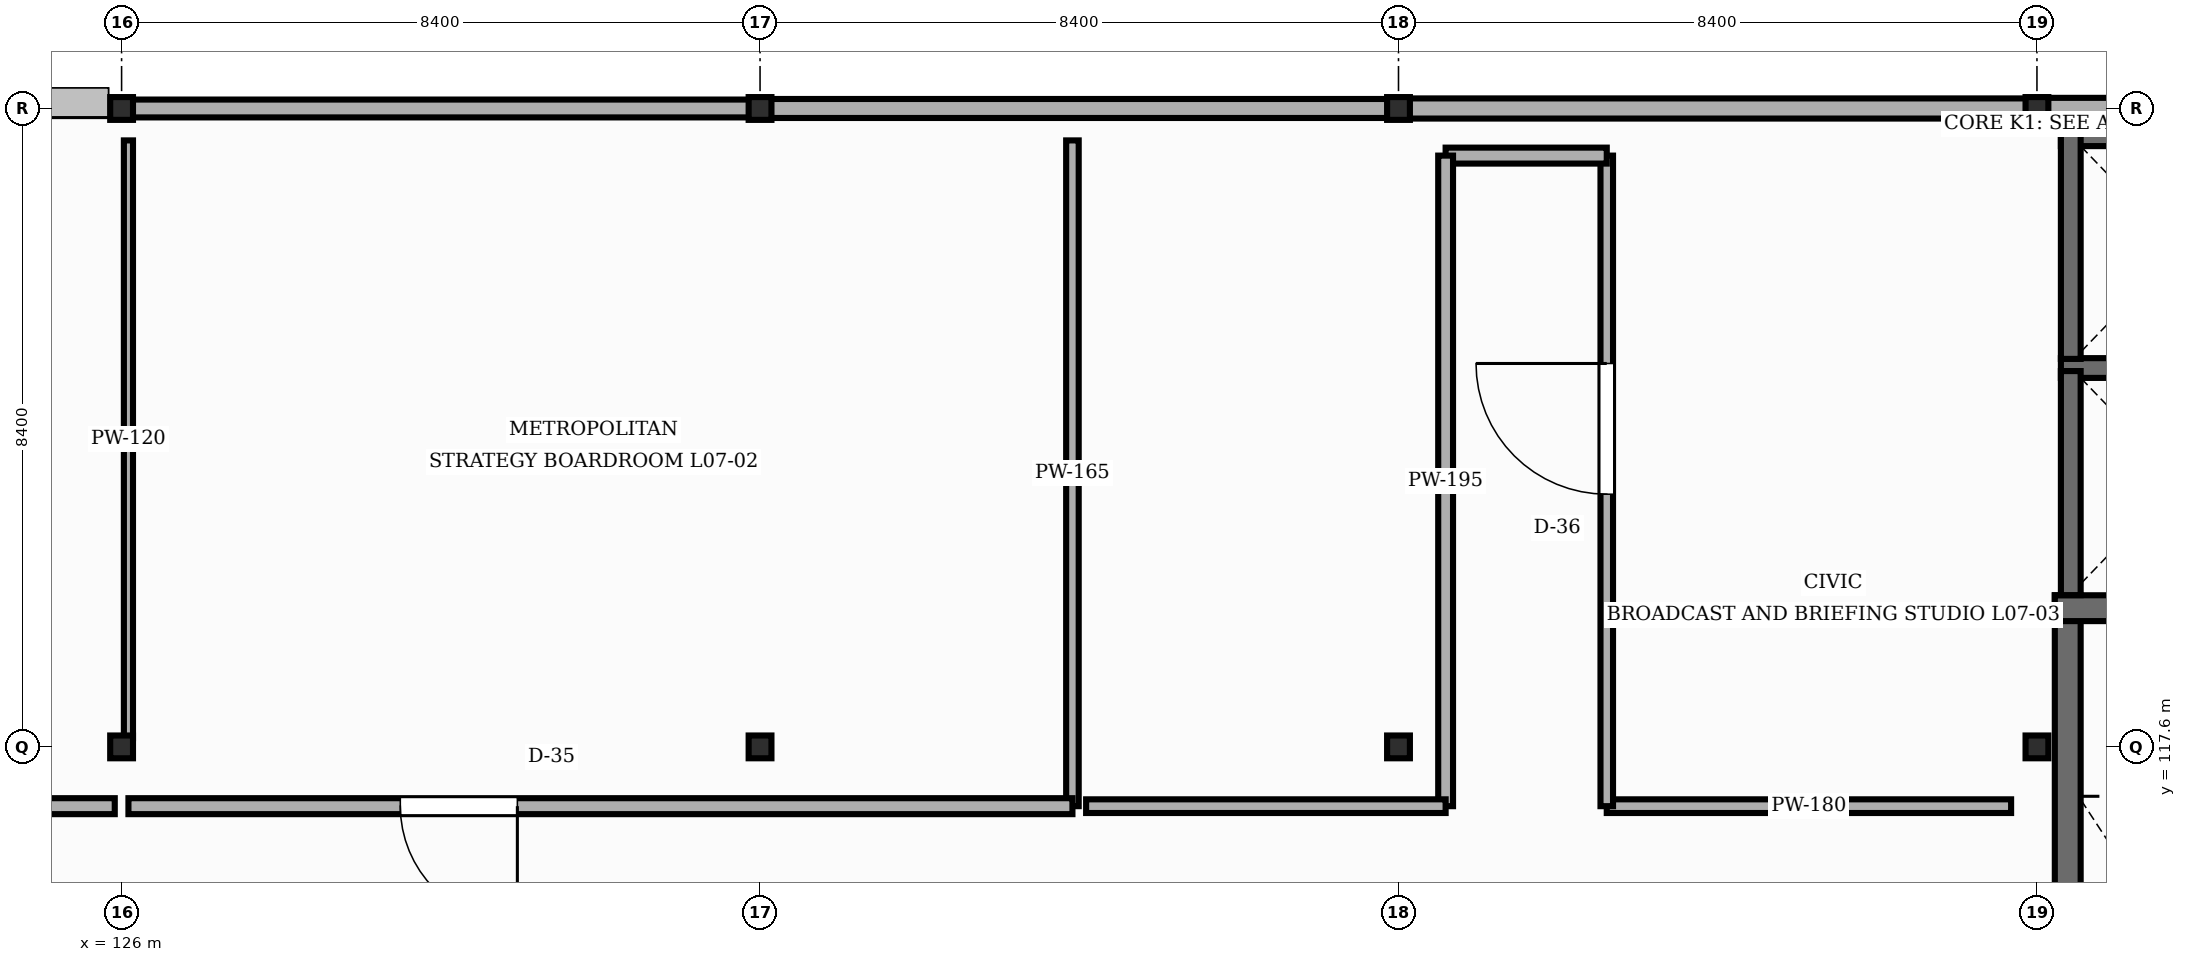
"""IFC4 building model, lengths in metres.
Left out: names, types, materials, properties, quantities, classifications, styles, units other than length and angle.
Written with IfcOpenShell. Run it as: python <this file> out.ifc"""

import sys

from ifc_helpers import new_model, si_unit, direction, frame, frame_2d, origin, origin_2d, place, context, subcontext, project, spatial, rectangle, i_section, extrude, element, fill, save


model = new_model("IFC4")
c1 = context("Model", 3, precision=1e-05, world=origin(), true_north=direction((0.0, 1.0)))
c2 = subcontext(c1, "Body", "Model", "MODEL_VIEW")
j1 = project(units=[si_unit("LENGTHUNIT", "METRE"), si_unit("PLANEANGLEUNIT", "RADIAN")], contexts=[c1])
p1 = place(None, origin())
s1 = spatial("IfcSite", under=j1, at=p1, CompositionType="ELEMENT")
p2 = place(p1, origin())
s2 = spatial("IfcBuilding", under=s1, at=p2, CompositionType="ELEMENT")
p3 = place(p2, frame((0.0, 0.0, 30.15)))
s3 = spatial("IfcBuildingStorey", under=s2, at=p3, CompositionType="ELEMENT", Elevation=30.15)
for number, where, z_axis, x_axis in (
    (1, (126.0, 117.6, 0.0), (0.0, 0.0, 1.0), (1.0, 0.0, 0.0)),
    (2, (126.0, 126.0, 0.0), (0.0, 0.0, 1.0), (1.0, 0.0, 0.0)),
    (3, (134.4, 117.6, 0.0), (0.0, 0.0, 1.0), (1.0, 0.0, 0.0)),
    (4, (134.4, 126.0, 0.0), (0.0, 0.0, 1.0), (1.0, 0.0, 0.0)),
    (5, (142.8, 117.6, 0.0), (0.0, 0.0, 1.0), (1.0, 0.0, 0.0)),
    (6, (142.8, 126.0, 0.0), (0.0, 0.0, 1.0), (1.0, 0.0, 0.0)),
    (7, (151.2, 117.6, 0.0), (0.0, 0.0, 1.0), (1.0, 0.0, 0.0)),
    (8, (151.2, 126.0, 0.0), (0.0, 0.0, 1.0), (1.0, 0.0, 0.0)),
):
    element("IfcColumn", number, at=place(p3, frame(where, z_axis=z_axis, x_axis=x_axis)), inside=s3, PredefinedType="COLUMN", context=c2, shape_type="SweptSolid", body=[
        extrude(i_section(OverallWidth=0.3, OverallDepth=0.3, WebThickness=0.011, FlangeThickness=0.019, FilletRadius=0.027, at=origin_2d()), origin(), (0.0, 0.0, 1.0), 4.2),
    ])
p4 = place(p3, frame((159.592, 126.0, 0.0), z_axis=(0.0, 0.0, 1.0), x_axis=(-1.0, 0.0, 0.0)))
e9 = element("IfcWall", 9, at=p4, inside=s3, PredefinedType="STANDARD", context=c2, shape_type="SweptSolid", body=[
    extrude(rectangle(XDim=8.384, YDim=0.28, at=frame_2d((4.192, 0.0))), origin(), (0.0, 0.0, 1.0), 3.692),
])
p5 = place(p3, frame((151.192, 126.0, 0.0), z_axis=(0.0, 0.0, 1.0), x_axis=(-1.0, 0.0, 0.0)))
e10 = element("IfcWall", 10, at=p5, inside=s3, PredefinedType="STANDARD", context=c2, shape_type="SweptSolid", body=[
    extrude(rectangle(XDim=8.384, YDim=0.265, at=frame_2d((4.192, 0.0))), origin(), (0.0, 0.0, 1.0), 3.662),
])
p6 = place(p3, frame((142.792, 126.0, 0.0), z_axis=(0.0, 0.0, 1.0), x_axis=(-1.0, 0.0, 0.0)))
e11 = element("IfcWall", 11, at=p6, inside=s3, PredefinedType="STANDARD", context=c2, shape_type="SweptSolid", body=[
    extrude(rectangle(XDim=8.384, YDim=0.25, at=frame_2d((4.192, 0.0))), origin(), (0.0, 0.0, 1.0), 3.692),
])
p7 = place(p3, frame((134.392, 126.0, 0.0), z_axis=(0.0, 0.0, 1.0), x_axis=(-1.0, 0.0, 0.0)))
e12 = element("IfcWall", 12, at=p7, inside=s3, PredefinedType="STANDARD", context=c2, shape_type="SweptSolid", body=[
    extrude(rectangle(XDim=8.384, YDim=0.235, at=frame_2d((4.192, 0.0))), origin(), (0.0, 0.0, 1.0), 3.662),
])
p8 = place(p3, frame((151.605, 109.605, 0.0), z_axis=(0.0, 0.0, 1.0), x_axis=(0.0, 1.0, 0.0)))
e13 = element("IfcWall", 13, at=p8, inside=s3, PredefinedType="SHEAR", context=c2, shape_type="SweptSolid", body=[
    extrude(rectangle(XDim=9.99, YDim=0.34, at=frame_2d((4.995, 0.0))), origin(), (0.0, 0.0, 1.0), 4.0),
])
p9 = place(p3, frame((151.435, 119.425, 0.0), z_axis=(0.0, 0.0, 1.0), x_axis=(1.0, 0.0, 0.0)))
e14 = element("IfcWall", 14, at=p9, inside=s3, PredefinedType="SHEAR", context=c2, shape_type="SweptSolid", body=[
    extrude(rectangle(XDim=5.25, YDim=0.34, at=frame_2d((2.625, 0.0))), origin(), (0.0, 0.0, 1.0), 4.0),
])
p10 = place(p9, frame((3.535, 0.0, 0.0)))
e15 = element("IfcOpeningElement", 15, at=p10, cuts=e14, PredefinedType="OPENING", context=c2, shape_type="SweptSolid", body=[
    extrude(rectangle(XDim=1.15, YDim=2.15, at=frame_2d((0.575, 1.075))), frame((0.0, 0.18, 0.0), z_axis=(0.0, -1.0, 0.0), x_axis=(1.0, 0.0, 0.0)), (0.0, 0.0, 1.0), 0.36),
])
p11 = place(p3, frame((151.515, 122.585, 0.0), z_axis=(0.0, 0.0, 1.0), x_axis=(1.0, 0.0, 0.0)))
e16 = element("IfcWall", 16, at=p11, inside=s3, PredefinedType="SHEAR", context=c2, shape_type="SweptSolid", body=[
    extrude(rectangle(XDim=3.13, YDim=0.26, at=frame_2d((1.565, 0.0))), origin(), (0.0, 0.0, 1.0), 4.0),
])
p12 = place(p3, frame((151.645, 119.597, 0.0), z_axis=(0.0, 0.0, 1.0), x_axis=(0.0, 1.0, 0.0)))
e17 = element("IfcWall", 17, at=p12, inside=s3, PredefinedType="SHEAR", context=c2, shape_type="SweptSolid", body=[
    extrude(rectangle(XDim=2.948, YDim=0.26, at=frame_2d((1.474, 0.0))), origin(), (0.0, 0.0, 1.0), 4.0),
])
p13 = place(p3, frame((151.515, 125.635, 0.0), z_axis=(0.0, 0.0, 1.0), x_axis=(1.0, 0.0, 0.0)))
e18 = element("IfcWall", 18, at=p13, inside=s3, PredefinedType="SHEAR", context=c2, shape_type="SweptSolid", body=[
    extrude(rectangle(XDim=3.13, YDim=0.26, at=frame_2d((1.565, 0.0))), origin(), (0.0, 0.0, 1.0), 4.0),
])
p14 = place(p3, frame((151.645, 122.705, 0.0), z_axis=(0.0, 0.0, 1.0), x_axis=(0.0, 1.0, 0.0)))
e19 = element("IfcWall", 19, at=p14, inside=s3, PredefinedType="SHEAR", context=c2, shape_type="SweptSolid", body=[
    extrude(rectangle(XDim=3.06, YDim=0.26, at=frame_2d((1.53, 0.0))), origin(), (0.0, 0.0, 1.0), 4.0),
])
p15 = place(p3, frame((138.51, 125.58, -0.004), z_axis=(0.0, 0.0, 1.0), x_axis=(0.0, -1.0, 0.0)))
e20 = element("IfcWall", 20, at=p15, inside=s3, PredefinedType="STANDARD", context=c2, shape_type="SweptSolid", body=[
    extrude(rectangle(XDim=8.76, YDim=0.165, at=frame_2d((4.38, 0.0))), origin(), (0.0, 0.0, 1.0), 4.004),
])
p16 = place(p3, frame((138.51, 116.82, -0.004), z_axis=(0.0, 0.0, 1.0), x_axis=(-1.0, 0.0, 0.0)))
e21 = element("IfcWall", 21, at=p16, inside=s3, PredefinedType="STANDARD", context=c2, shape_type="SweptSolid", body=[
    extrude(rectangle(XDim=12.42, YDim=0.21, at=frame_2d((6.21, 0.0))), origin(), (0.0, 0.0, 1.0), 4.004),
])
p17 = place(p16, frame((7.303, 0.0, 0.0)))
e22 = element("IfcOpeningElement", 22, at=p17, cuts=e21, PredefinedType="OPENING", context=c2, shape_type="SweptSolid", body=[
    extrude(rectangle(XDim=1.54, YDim=2.3, at=frame_2d((0.77, 1.15))), frame((0.0, 0.115, 0.0), z_axis=(0.0, -1.0, 0.0), x_axis=(1.0, 0.0, 0.0)), (0.0, 0.0, 1.0), 0.23),
])
p18 = place(p3, frame((126.09, 117.715, -0.004), z_axis=(0.0, 0.0, 1.0), x_axis=(0.0, 1.0, 0.0)))
e23 = element("IfcWall", 23, at=p18, inside=s3, PredefinedType="STANDARD", context=c2, shape_type="SweptSolid", body=[
    extrude(rectangle(XDim=7.865, YDim=0.12, at=frame_2d((3.933, 0.0))), origin(), (0.0, 0.0, 1.0), 3.756),
])
p19 = place(p3, frame((150.86, 116.82, -0.004), z_axis=(0.0, 0.0, 1.0), x_axis=(-1.0, 0.0, 0.0)))
e24 = element("IfcWall", 24, at=p19, inside=s3, PredefinedType="STANDARD", context=c2, shape_type="SweptSolid", body=[
    extrude(rectangle(XDim=5.32, YDim=0.18, at=frame_2d((2.66, 0.0))), origin(), (0.0, 0.0, 1.0), 4.004),
])
p20 = place(p3, frame((145.54, 116.82, -0.004), z_axis=(0.0, 0.0, 1.0), x_axis=(0.0, 1.0, 0.0)))
e25 = element("IfcWall", 25, at=p20, inside=s3, PredefinedType="STANDARD", context=c2, shape_type="SweptSolid", body=[
    extrude(rectangle(XDim=8.56, YDim=0.165, at=frame_2d((4.28, 0.0))), origin(), (0.0, 0.0, 1.0), 4.004),
])
p21 = place(p20, frame((4.105, 0.0, 0.0)))
e26 = element("IfcOpeningElement", 26, at=p21, cuts=e25, PredefinedType="OPENING", context=c2, shape_type="SweptSolid", body=[
    extrude(rectangle(XDim=1.72, YDim=2.3, at=frame_2d((0.86, 1.15))), frame((0.0, 0.093, 0.0), z_axis=(0.0, -1.0, 0.0), x_axis=(1.0, 0.0, 0.0)), (0.0, 0.0, 1.0), 0.185),
])
p22 = place(p3, frame((145.54, 125.38, -0.004), z_axis=(0.0, 0.0, 1.0), x_axis=(-1.0, 0.0, 0.0)))
e27 = element("IfcWall", 27, at=p22, inside=s3, PredefinedType="STANDARD", context=c2, shape_type="SweptSolid", body=[
    extrude(rectangle(XDim=2.12, YDim=0.21, at=frame_2d((1.06, 0.0))), origin(), (0.0, 0.0, 1.0), 4.004),
])
p23 = place(p3, frame((143.42, 125.38, -0.004), z_axis=(0.0, 0.0, 1.0), x_axis=(0.0, -1.0, 0.0)))
e28 = element("IfcWall", 28, at=p23, inside=s3, PredefinedType="STANDARD", context=c2, shape_type="SweptSolid", body=[
    extrude(rectangle(XDim=8.56, YDim=0.195, at=frame_2d((4.28, 0.0))), origin(), (0.0, 0.0, 1.0), 4.004),
])
p24 = place(p3, frame((143.42, 116.82, -0.004), z_axis=(0.0, 0.0, 1.0), x_axis=(-1.0, 0.0, 0.0)))
e29 = element("IfcWall", 29, at=p24, inside=s3, PredefinedType="STANDARD", context=c2, shape_type="SweptSolid", body=[
    extrude(rectangle(XDim=4.73, YDim=0.18, at=frame_2d((2.365, 0.0))), origin(), (0.0, 0.0, 1.0), 4.004),
])
p25 = place(p3, frame((125.91, 116.82, -0.004), z_axis=(0.0, 0.0, 1.0), x_axis=(-1.0, 0.0, 0.0)))
e30 = element("IfcWall", 30, at=p25, inside=s3, PredefinedType="STANDARD", context=c2, shape_type="SweptSolid", body=[
    extrude(rectangle(XDim=9.74, YDim=0.21, at=frame_2d((4.87, 0.0))), origin(), (0.0, 0.0, 1.0), 4.004),
])
p26 = place(p17, origin())
e31 = element("IfcDoor", 31, at=p26, inside=s3, OperationType="SINGLE_SWING_LEFT", PredefinedType="DOOR", context=c2, shape_type="SweptSolid", body=[
    extrude(rectangle(XDim=1.54, YDim=2.3, at=frame_2d((0.77, 1.15))), frame((0.0, 0.025, 0.0), z_axis=(0.0, -1.0, 0.0), x_axis=(1.0, 0.0, 0.0)), (0.0, 0.0, 1.0), 0.05),
])
fill(e22, e31)
p27 = place(p21, origin())
e32 = element("IfcDoor", 32, at=p27, inside=s3, OperationType="SINGLE_SWING_RIGHT", PredefinedType="DOOR", context=c2, shape_type="SweptSolid", body=[
    extrude(rectangle(XDim=1.72, YDim=2.3, at=frame_2d((0.86, 1.15))), frame((0.0, 0.025, 0.0), z_axis=(0.0, -1.0, 0.0), x_axis=(1.0, 0.0, 0.0)), (0.0, 0.0, 1.0), 0.05),
])
fill(e26, e32)
save(model, sys.argv[1])
